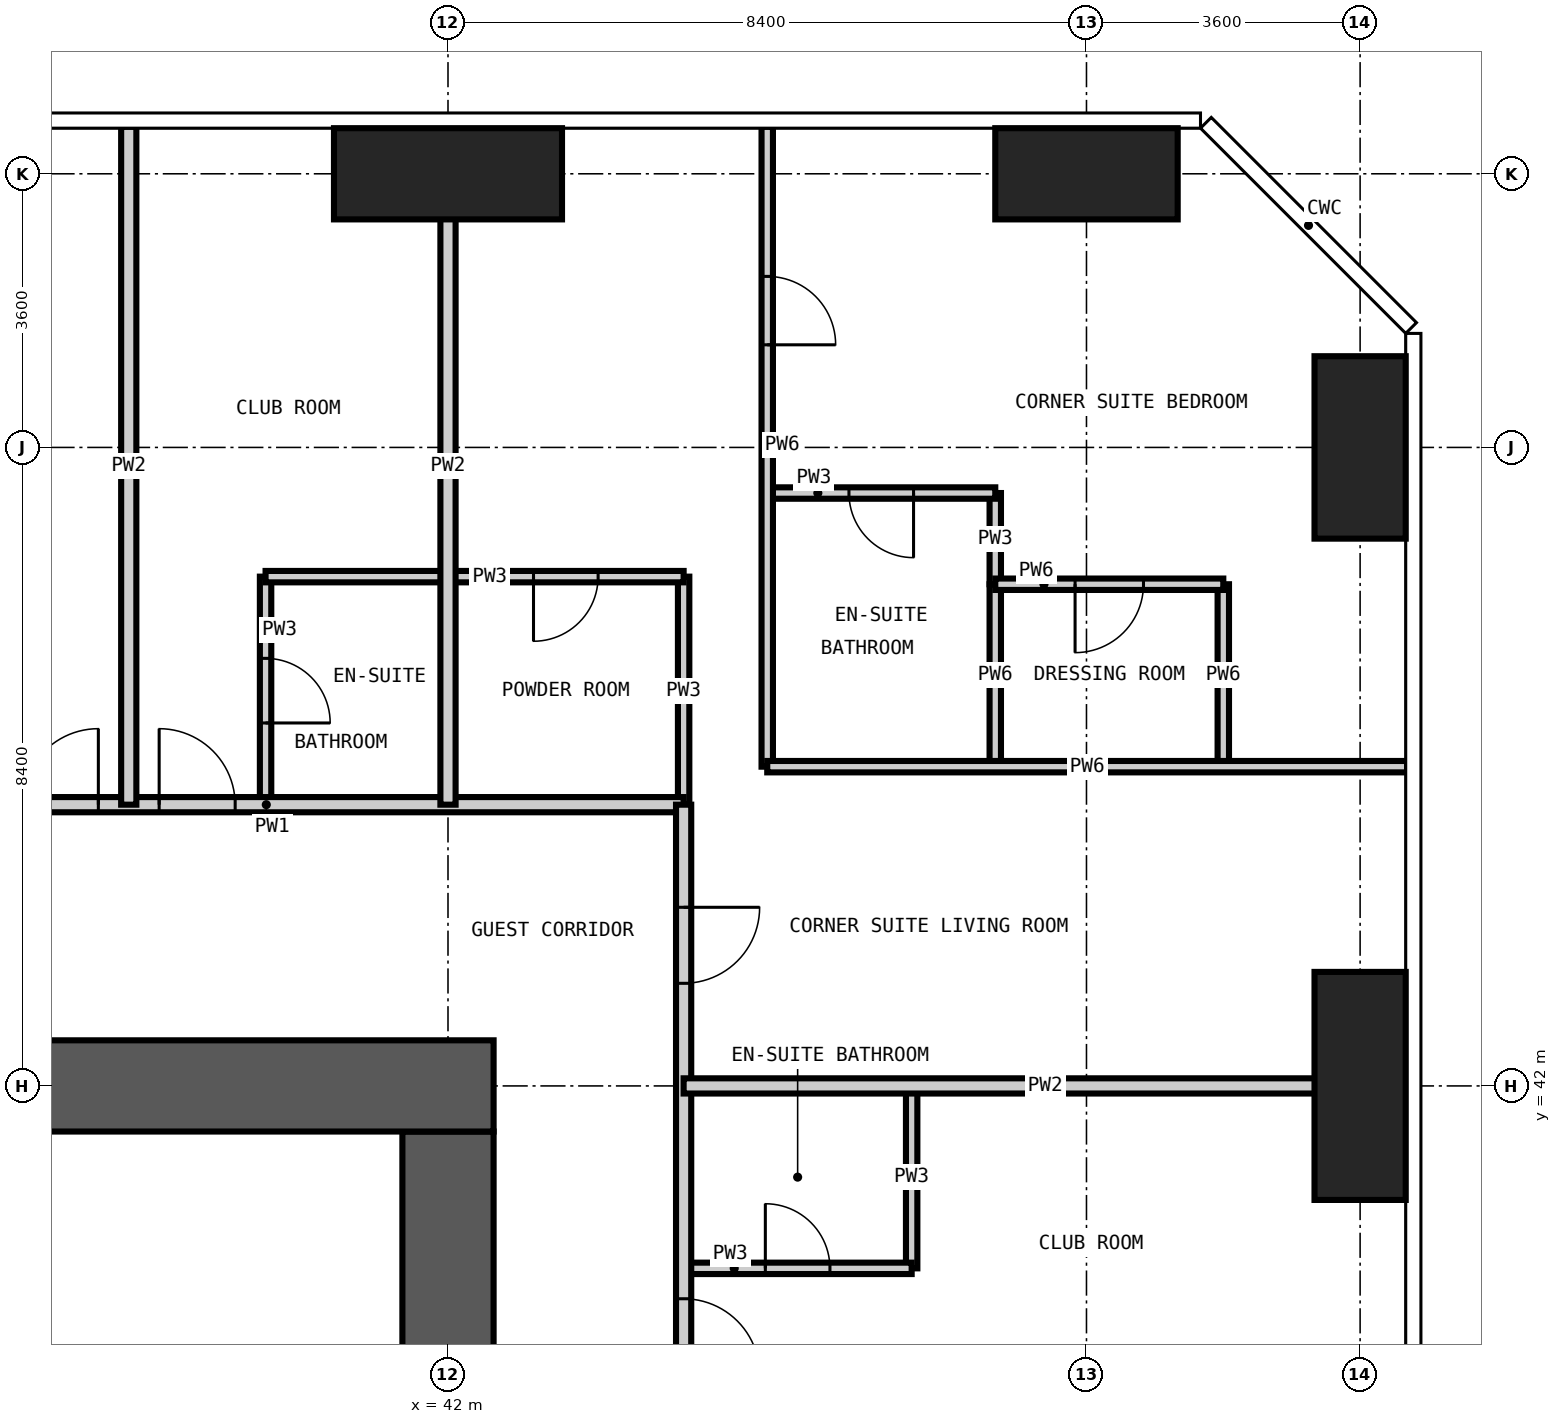
"""IFC4 building model, lengths in metres.
Left out: names, types, materials, properties, quantities, classifications, styles, units other than length and angle.
Written with IfcOpenShell. Run it as: python <this file> out.ifc"""

import sys

from ifc_helpers import new_model, si_unit, direction, frame, frame_2d, origin, origin_2d, place, context, subcontext, project, spatial, rectangle, extrude, element, fill, save


model = new_model("IFC4")
c1 = context("Model", 3, precision=1e-05, world=origin(), true_north=direction((0.0, 1.0)))
c2 = subcontext(c1, "Body", "Model", "MODEL_VIEW")
j1 = project(units=[si_unit("LENGTHUNIT", "METRE"), si_unit("PLANEANGLEUNIT", "RADIAN")], contexts=[c1])
p1 = place(None, origin())
s1 = spatial("IfcSite", under=j1, at=p1, CompositionType="ELEMENT")
p2 = place(p1, origin())
s2 = spatial("IfcBuilding", under=s1, at=p2, CompositionType="ELEMENT")
p3 = place(p2, frame((0.0, 0.0, 159.0)))
s3 = spatial("IfcBuildingStorey", under=s2, at=p3, CompositionType="ELEMENT", Elevation=159.0)
p4 = place(p3, frame((42.0, 54.0, -0.35), z_axis=(0.0, 0.0, 1.0), x_axis=(1.0, 0.0, 0.0)))
e1 = element("IfcColumn", 1, at=p4, inside=s3, PredefinedType="COLUMN", context=c2, shape_type="SweptSolid", body=[
    extrude(rectangle(XDim=3.0, YDim=1.2, at=origin_2d()), origin(), (0.0, 0.0, 1.0), 3.6),
])
p5 = place(p3, frame((50.4, 54.0, -0.35), z_axis=(0.0, 0.0, 1.0), x_axis=(1.0, 0.0, 0.0)))
e2 = element("IfcColumn", 2, at=p5, inside=s3, PredefinedType="COLUMN", context=c2, shape_type="SweptSolid", body=[
    extrude(rectangle(XDim=2.4, YDim=1.2, at=origin_2d()), origin(), (0.0, 0.0, 1.0), 3.6),
])
p6 = place(p3, frame((54.0, 42.0, -0.35), z_axis=(0.0, 0.0, 1.0), x_axis=(1.0, 0.0, 0.0)))
e3 = element("IfcColumn", 3, at=p6, inside=s3, PredefinedType="COLUMN", context=c2, shape_type="SweptSolid", body=[
    extrude(rectangle(XDim=1.2, YDim=3.0, at=origin_2d()), origin(), (0.0, 0.0, 1.0), 3.6),
])
p7 = place(p3, frame((54.0, 50.4, -0.35), z_axis=(0.0, 0.0, 1.0), x_axis=(1.0, 0.0, 0.0)))
e4 = element("IfcColumn", 4, at=p7, inside=s3, PredefinedType="COLUMN", context=c2, shape_type="SweptSolid", body=[
    extrude(rectangle(XDim=1.2, YDim=2.4, at=origin_2d()), origin(), (0.0, 0.0, 1.0), 3.6),
])
p8 = place(p3, frame((42.0, 17.4, -0.35), z_axis=(0.0, 0.0, 1.0), x_axis=(0.0, 1.0, 0.0)))
e5 = element("IfcWall", 5, at=p8, inside=s3, PredefinedType="SHEAR", context=c2, shape_type="SweptSolid", body=[
    extrude(rectangle(XDim=24.0, YDim=1.2, at=frame_2d((12.0, 0.0))), origin(), (0.0, 0.0, 1.0), 3.6),
])
p9 = place(p8, frame((0.2, 0.0, 0.35)))
e6 = element("IfcOpeningElement", 6, at=p9, cuts=e5, PredefinedType="OPENING", context=c2, shape_type="SweptSolid", body=[
    extrude(rectangle(XDim=1.2, YDim=2.2, at=frame_2d((0.6, 1.1))), frame((0.0, 0.61, 0.0), z_axis=(0.0, -1.0, 0.0), x_axis=(1.0, 0.0, 0.0)), (0.0, 0.0, 1.0), 1.22),
])
p10 = place(p8, frame((11.5, 0.0, 0.35)))
e7 = element("IfcOpeningElement", 7, at=p10, cuts=e5, PredefinedType="OPENING", context=c2, shape_type="SweptSolid", body=[
    extrude(rectangle(XDim=1.0, YDim=2.1, at=frame_2d((0.5, 1.05))), frame((0.0, 0.61, 0.0), z_axis=(0.0, -1.0, 0.0), x_axis=(1.0, 0.0, 0.0)), (0.0, 0.0, 1.0), 1.22),
])
p11 = place(p8, frame((19.9, 0.0, 0.35)))
e8 = element("IfcOpeningElement", 8, at=p11, cuts=e5, PredefinedType="OPENING", context=c2, shape_type="SweptSolid", body=[
    extrude(rectangle(XDim=1.0, YDim=2.1, at=frame_2d((0.5, 1.05))), frame((0.0, 0.61, 0.0), z_axis=(0.0, -1.0, 0.0), x_axis=(1.0, 0.0, 0.0)), (0.0, 0.0, 1.0), 1.22),
])
p12 = place(p3, frame((42.6, 42.0, -0.35), z_axis=(0.0, 0.0, 1.0), x_axis=(-1.0, 0.0, 0.0)))
e9 = element("IfcWall", 9, at=p12, inside=s3, PredefinedType="SHEAR", context=c2, shape_type="SweptSolid", body=[
    extrude(rectangle(XDim=26.4, YDim=1.2, at=frame_2d((13.2, 0.0))), origin(), (0.0, 0.0, 1.0), 3.6),
])
p13 = place(p12, frame((21.1, 0.0, 0.35)))
e10 = element("IfcOpeningElement", 10, at=p13, cuts=e9, PredefinedType="OPENING", context=c2, shape_type="SweptSolid", body=[
    extrude(rectangle(XDim=1.0, YDim=2.1, at=frame_2d((0.5, 1.05))), frame((0.0, 0.61, 0.0), z_axis=(0.0, -1.0, 0.0), x_axis=(1.0, 0.0, 0.0)), (0.0, 0.0, 1.0), 1.22),
])
p14 = place(p12, frame((10.5, 0.0, 0.35)))
e11 = element("IfcOpeningElement", 11, at=p14, cuts=e9, PredefinedType="OPENING", context=c2, shape_type="SweptSolid", body=[
    extrude(rectangle(XDim=1.2, YDim=2.2, at=frame_2d((0.6, 1.1))), frame((0.0, 0.61, 0.0), z_axis=(0.0, -1.0, 0.0), x_axis=(1.0, 0.0, 0.0)), (0.0, 0.0, 1.0), 1.22),
])
p15 = place(p3, frame((39.6, 45.7, 0.0), z_axis=(0.0, 0.0, 1.0), x_axis=(0.0, 1.0, 0.0)))
e12 = element("IfcWall", 12, at=p15, inside=s3, PredefinedType="PARTITIONING", context=c2, shape_type="SweptSolid", body=[
    extrude(rectangle(XDim=3.0, YDim=0.15, at=frame_2d((1.5, 0.0))), origin(), (0.0, 0.0, 1.0), 3.25),
])
p16 = place(p15, frame((1.075, 0.0, 0.0)))
e13 = element("IfcOpeningElement", 13, at=p16, cuts=e12, PredefinedType="OPENING", context=c2, shape_type="SweptSolid", body=[
    extrude(rectangle(XDim=0.85, YDim=2.1, at=frame_2d((0.425, 1.05))), frame((0.0, 0.085, 0.0), z_axis=(0.0, -1.0, 0.0), x_axis=(1.0, 0.0, 0.0)), (0.0, 0.0, 1.0), 0.17),
])
p17 = place(p3, frame((45.1, 45.7, 0.0), z_axis=(0.0, 0.0, 1.0), x_axis=(0.0, 1.0, 0.0)))
e14 = element("IfcWall", 14, at=p17, inside=s3, PredefinedType="PARTITIONING", context=c2, shape_type="SweptSolid", body=[
    extrude(rectangle(XDim=3.0, YDim=0.15, at=frame_2d((1.5, 0.0))), origin(), (0.0, 0.0, 1.0), 3.25),
])
p18 = place(p3, frame((48.1, 39.6, 0.0), z_axis=(0.0, 0.0, 1.0), x_axis=(0.0, 1.0, 0.0)))
e15 = element("IfcWall", 15, at=p18, inside=s3, PredefinedType="PARTITIONING", context=c2, shape_type="SweptSolid", body=[
    extrude(rectangle(XDim=2.4, YDim=0.15, at=frame_2d((1.2, 0.0))), origin(), (0.0, 0.0, 1.0), 3.25),
])
p19 = place(p3, frame((49.2, 48.6, 0.0), z_axis=(0.0, 0.0, 1.0), x_axis=(0.0, 1.0, 0.0)))
e16 = element("IfcWall", 16, at=p19, inside=s3, PredefinedType="PARTITIONING", context=c2, shape_type="SweptSolid", body=[
    extrude(rectangle(XDim=1.2, YDim=0.15, at=frame_2d((0.6, 0.0))), origin(), (0.0, 0.0, 1.0), 3.25),
])
p20 = place(p3, frame((45.1, 39.6, 0.0), z_axis=(0.0, 0.0, 1.0), x_axis=(1.0, 0.0, 0.0)))
e17 = element("IfcWall", 17, at=p20, inside=s3, PredefinedType="PARTITIONING", context=c2, shape_type="SweptSolid", body=[
    extrude(rectangle(XDim=3.0, YDim=0.15, at=frame_2d((1.5, 0.0))), origin(), (0.0, 0.0, 1.0), 3.25),
])
p21 = place(p20, frame((1.075, 0.0, 0.0)))
e18 = element("IfcOpeningElement", 18, at=p21, cuts=e17, PredefinedType="OPENING", context=c2, shape_type="SweptSolid", body=[
    extrude(rectangle(XDim=0.85, YDim=2.1, at=frame_2d((0.425, 1.05))), frame((0.0, 0.085, 0.0), z_axis=(0.0, -1.0, 0.0), x_axis=(1.0, 0.0, 0.0)), (0.0, 0.0, 1.0), 0.17),
])
p22 = place(p3, frame((39.6, 48.7, 0.0), z_axis=(0.0, 0.0, 1.0), x_axis=(1.0, 0.0, 0.0)))
e19 = element("IfcWall", 19, at=p22, inside=s3, PredefinedType="PARTITIONING", context=c2, shape_type="SweptSolid", body=[
    extrude(rectangle(XDim=5.5, YDim=0.15, at=frame_2d((2.75, 0.0))), origin(), (0.0, 0.0, 1.0), 3.25),
])
p23 = place(p22, frame((3.525, 0.0, 0.0)))
e20 = element("IfcOpeningElement", 20, at=p23, cuts=e19, PredefinedType="OPENING", context=c2, shape_type="SweptSolid", body=[
    extrude(rectangle(XDim=0.85, YDim=2.1, at=frame_2d((0.425, 1.05))), frame((0.0, 0.085, 0.0), z_axis=(0.0, -1.0, 0.0), x_axis=(1.0, 0.0, 0.0)), (0.0, 0.0, 1.0), 0.17),
])
p24 = place(p3, frame((46.2, 49.8, 0.0), z_axis=(0.0, 0.0, 1.0), x_axis=(1.0, 0.0, 0.0)))
e21 = element("IfcWall", 21, at=p24, inside=s3, PredefinedType="PARTITIONING", context=c2, shape_type="SweptSolid", body=[
    extrude(rectangle(XDim=3.0, YDim=0.15, at=frame_2d((1.5, 0.0))), origin(), (0.0, 0.0, 1.0), 3.25),
])
p25 = place(p24, frame((1.075, 0.0, 0.0)))
e22 = element("IfcOpeningElement", 22, at=p25, cuts=e21, PredefinedType="OPENING", context=c2, shape_type="SweptSolid", body=[
    extrude(rectangle(XDim=0.85, YDim=2.1, at=frame_2d((0.425, 1.05))), frame((0.0, 0.085, 0.0), z_axis=(0.0, -1.0, 0.0), x_axis=(1.0, 0.0, 0.0)), (0.0, 0.0, 1.0), 0.17),
])
p26 = place(p3, frame((33.6, 45.7, 0.0), z_axis=(0.0, 0.0, 1.0), x_axis=(1.0, 0.0, 0.0)))
e23 = element("IfcWall", 23, at=p26, inside=s3, PredefinedType="PARTITIONING", context=c2, shape_type="SweptSolid", body=[
    extrude(rectangle(XDim=11.5, YDim=0.2, at=frame_2d((5.75, 0.0))), origin(), (0.0, 0.0, 1.0), 3.25),
])
p27 = place(p26, frame((2.8, 0.0, 0.0)))
e24 = element("IfcOpeningElement", 24, at=p27, cuts=e23, PredefinedType="OPENING", context=c2, shape_type="SweptSolid", body=[
    extrude(rectangle(XDim=1.0, YDim=2.2, at=frame_2d((0.5, 1.1))), frame((0.0, 0.11, 0.0), z_axis=(0.0, -1.0, 0.0), x_axis=(1.0, 0.0, 0.0)), (0.0, 0.0, 1.0), 0.22),
])
p28 = place(p26, frame((4.6, 0.0, 0.0)))
e25 = element("IfcOpeningElement", 25, at=p28, cuts=e23, PredefinedType="OPENING", context=c2, shape_type="SweptSolid", body=[
    extrude(rectangle(XDim=1.0, YDim=2.2, at=frame_2d((0.5, 1.1))), frame((0.0, 0.11, 0.0), z_axis=(0.0, -1.0, 0.0), x_axis=(1.0, 0.0, 0.0)), (0.0, 0.0, 1.0), 0.22),
])
p29 = place(p3, frame((45.1, 45.7, 0.0), z_axis=(0.0, 0.0, 1.0), x_axis=(0.0, -1.0, 0.0)))
e26 = element("IfcWall", 26, at=p29, inside=s3, PredefinedType="PARTITIONING", context=c2, shape_type="SweptSolid", body=[
    extrude(rectangle(XDim=31.4, YDim=0.2, at=frame_2d((15.7, 0.0))), origin(), (0.0, 0.0, 1.0), 3.25),
])
p30 = place(p29, frame((25.1, 0.0, 0.0)))
e27 = element("IfcOpeningElement", 27, at=p30, cuts=e26, PredefinedType="OPENING", context=c2, shape_type="SweptSolid", body=[
    extrude(rectangle(XDim=1.0, YDim=2.2, at=frame_2d((0.5, 1.1))), frame((0.0, 0.11, 0.0), z_axis=(0.0, -1.0, 0.0), x_axis=(1.0, 0.0, 0.0)), (0.0, 0.0, 1.0), 0.22),
])
p31 = place(p29, frame((23.3, 0.0, 0.0)))
e28 = element("IfcOpeningElement", 28, at=p31, cuts=e26, PredefinedType="OPENING", context=c2, shape_type="SweptSolid", body=[
    extrude(rectangle(XDim=1.0, YDim=2.2, at=frame_2d((0.5, 1.1))), frame((0.0, 0.11, 0.0), z_axis=(0.0, -1.0, 0.0), x_axis=(1.0, 0.0, 0.0)), (0.0, 0.0, 1.0), 0.22),
])
p32 = place(p29, frame((16.7, 0.0, 0.0)))
e29 = element("IfcOpeningElement", 29, at=p32, cuts=e26, PredefinedType="OPENING", context=c2, shape_type="SweptSolid", body=[
    extrude(rectangle(XDim=1.0, YDim=2.2, at=frame_2d((0.5, 1.1))), frame((0.0, 0.11, 0.0), z_axis=(0.0, -1.0, 0.0), x_axis=(1.0, 0.0, 0.0)), (0.0, 0.0, 1.0), 0.22),
])
p33 = place(p29, frame((14.9, 0.0, 0.0)))
e30 = element("IfcOpeningElement", 30, at=p33, cuts=e26, PredefinedType="OPENING", context=c2, shape_type="SweptSolid", body=[
    extrude(rectangle(XDim=1.0, YDim=2.2, at=frame_2d((0.5, 1.1))), frame((0.0, 0.11, 0.0), z_axis=(0.0, -1.0, 0.0), x_axis=(1.0, 0.0, 0.0)), (0.0, 0.0, 1.0), 0.22),
])
p34 = place(p29, frame((8.3, 0.0, 0.0)))
e31 = element("IfcOpeningElement", 31, at=p34, cuts=e26, PredefinedType="OPENING", context=c2, shape_type="SweptSolid", body=[
    extrude(rectangle(XDim=1.0, YDim=2.2, at=frame_2d((0.5, 1.1))), frame((0.0, 0.11, 0.0), z_axis=(0.0, -1.0, 0.0), x_axis=(1.0, 0.0, 0.0)), (0.0, 0.0, 1.0), 0.22),
])
p35 = place(p29, frame((6.5, 0.0, 0.0)))
e32 = element("IfcOpeningElement", 32, at=p35, cuts=e26, PredefinedType="OPENING", context=c2, shape_type="SweptSolid", body=[
    extrude(rectangle(XDim=1.0, YDim=2.2, at=frame_2d((0.5, 1.1))), frame((0.0, 0.11, 0.0), z_axis=(0.0, -1.0, 0.0), x_axis=(1.0, 0.0, 0.0)), (0.0, 0.0, 1.0), 0.22),
])
p36 = place(p29, frame((29.65, 0.0, 0.0)))
e33 = element("IfcOpeningElement", 33, at=p36, cuts=e26, PredefinedType="OPENING", context=c2, shape_type="SweptSolid", body=[
    extrude(rectangle(XDim=1.0, YDim=2.2, at=frame_2d((0.5, 1.1))), frame((0.0, 0.11, 0.0), z_axis=(0.0, -1.0, 0.0), x_axis=(1.0, 0.0, 0.0)), (0.0, 0.0, 1.0), 0.22),
])
p37 = place(p29, frame((1.35, 0.0, 0.0)))
e34 = element("IfcOpeningElement", 34, at=p37, cuts=e26, PredefinedType="OPENING", context=c2, shape_type="SweptSolid", body=[
    extrude(rectangle(XDim=1.0, YDim=2.2, at=frame_2d((0.5, 1.1))), frame((0.0, 0.11, 0.0), z_axis=(0.0, -1.0, 0.0), x_axis=(1.0, 0.0, 0.0)), (0.0, 0.0, 1.0), 0.22),
])
for number, where, z_axis, x_axis in (
    (35, (37.8, 45.7, 0.0), (0.0, 0.0, 1.0), (0.0, 1.0, 0.0)),
    (36, (42.0, 45.7, 0.0), (0.0, 0.0, 1.0), (0.0, 1.0, 0.0)),
):
    element("IfcWall", number, at=place(p3, frame(where, z_axis=z_axis, x_axis=x_axis)), inside=s3, PredefinedType="PARTITIONING", context=c2, shape_type="SweptSolid", body=[
        extrude(rectangle(XDim=8.918, YDim=0.2, at=frame_2d((4.459, 0.0))), origin(), (0.0, 0.0, 1.0), 3.25),
    ])
p38 = place(p3, frame((45.1, 42.0, 0.0), z_axis=(0.0, 0.0, 1.0), x_axis=(1.0, 0.0, 0.0)))
e37 = element("IfcWall", 37, at=p38, inside=s3, PredefinedType="PARTITIONING", context=c2, shape_type="SweptSolid", body=[
    extrude(rectangle(XDim=9.518, YDim=0.2, at=frame_2d((4.759, 0.0))), origin(), (0.0, 0.0, 1.0), 3.25),
])
p39 = place(p3, frame((46.2, 46.2, 0.0), z_axis=(0.0, 0.0, 1.0), x_axis=(0.0, 1.0, 0.0)))
e38 = element("IfcWall", 38, at=p39, inside=s3, PredefinedType="PARTITIONING", context=c2, shape_type="SweptSolid", body=[
    extrude(rectangle(XDim=8.418, YDim=0.15, at=frame_2d((4.209, 0.0))), origin(), (0.0, 0.0, 1.0), 3.25),
])
p40 = place(p39, frame((5.55, 0.0, 0.0)))
e39 = element("IfcOpeningElement", 39, at=p40, cuts=e38, PredefinedType="OPENING", context=c2, shape_type="SweptSolid", body=[
    extrude(rectangle(XDim=0.9, YDim=2.1, at=frame_2d((0.45, 1.05))), frame((0.0, 0.085, 0.0), z_axis=(0.0, -1.0, 0.0), x_axis=(1.0, 0.0, 0.0)), (0.0, 0.0, 1.0), 0.17),
])
for number, where, z_axis, x_axis in (
    (40, (49.2, 46.2, 0.0), (0.0, 0.0, 1.0), (0.0, 1.0, 0.0)),
    (41, (52.2, 46.2, 0.0), (0.0, 0.0, 1.0), (0.0, 1.0, 0.0)),
):
    element("IfcWall", number, at=place(p3, frame(where, z_axis=z_axis, x_axis=x_axis)), inside=s3, PredefinedType="PARTITIONING", context=c2, shape_type="SweptSolid", body=[
        extrude(rectangle(XDim=2.4, YDim=0.15, at=frame_2d((1.2, 0.0))), origin(), (0.0, 0.0, 1.0), 3.25),
    ])
p41 = place(p3, frame((46.2, 46.2, 0.0), z_axis=(0.0, 0.0, 1.0), x_axis=(1.0, 0.0, 0.0)))
e42 = element("IfcWall", 42, at=p41, inside=s3, PredefinedType="PARTITIONING", context=c2, shape_type="SweptSolid", body=[
    extrude(rectangle(XDim=8.418, YDim=0.15, at=frame_2d((4.209, 0.0))), origin(), (0.0, 0.0, 1.0), 3.25),
])
p42 = place(p3, frame((49.2, 48.6, 0.0), z_axis=(0.0, 0.0, 1.0), x_axis=(1.0, 0.0, 0.0)))
e43 = element("IfcWall", 43, at=p42, inside=s3, PredefinedType="PARTITIONING", context=c2, shape_type="SweptSolid", body=[
    extrude(rectangle(XDim=3.0, YDim=0.15, at=frame_2d((1.5, 0.0))), origin(), (0.0, 0.0, 1.0), 3.25),
])
p43 = place(p42, frame((1.05, 0.0, 0.0)))
e44 = element("IfcOpeningElement", 44, at=p43, cuts=e43, PredefinedType="OPENING", context=c2, shape_type="SweptSolid", body=[
    extrude(rectangle(XDim=0.9, YDim=2.1, at=frame_2d((0.45, 1.05))), frame((0.0, 0.085, 0.0), z_axis=(0.0, -1.0, 0.0), x_axis=(1.0, 0.0, 0.0)), (0.0, 0.0, 1.0), 0.17),
])
p44 = place(p35, origin())
e45 = element("IfcDoor", 45, at=p44, inside=s3, OperationType="SINGLE_SWING_RIGHT", PredefinedType="DOOR", context=c2, shape_type="SweptSolid", body=[
    extrude(rectangle(XDim=1.0, YDim=2.2, at=frame_2d((0.5, 1.1))), frame((0.0, 0.025, 0.0), z_axis=(0.0, -1.0, 0.0), x_axis=(1.0, 0.0, 0.0)), (0.0, 0.0, 1.0), 0.05),
])
fill(e32, e45)
p45 = place(p21, origin())
e46 = element("IfcDoor", 46, at=p45, inside=s3, OperationType="SINGLE_SWING_LEFT", PredefinedType="DOOR", context=c2, shape_type="SweptSolid", body=[
    extrude(rectangle(XDim=0.85, YDim=2.1, at=frame_2d((0.425, 1.05))), frame((0.0, 0.025, 0.0), z_axis=(0.0, -1.0, 0.0), x_axis=(1.0, 0.0, 0.0)), (0.0, 0.0, 1.0), 0.05),
])
fill(e18, e46)
p46 = place(p27, origin())
e47 = element("IfcDoor", 47, at=p46, inside=s3, OperationType="SINGLE_SWING_RIGHT", PredefinedType="DOOR", context=c2, shape_type="SweptSolid", body=[
    extrude(rectangle(XDim=1.0, YDim=2.2, at=frame_2d((0.5, 1.1))), frame((0.0, 0.025, 0.0), z_axis=(0.0, -1.0, 0.0), x_axis=(1.0, 0.0, 0.0)), (0.0, 0.0, 1.0), 0.05),
])
fill(e24, e47)
p47 = place(p28, origin())
e48 = element("IfcDoor", 48, at=p47, inside=s3, OperationType="SINGLE_SWING_LEFT", PredefinedType="DOOR", context=c2, shape_type="SweptSolid", body=[
    extrude(rectangle(XDim=1.0, YDim=2.2, at=frame_2d((0.5, 1.1))), frame((0.0, 0.025, 0.0), z_axis=(0.0, -1.0, 0.0), x_axis=(1.0, 0.0, 0.0)), (0.0, 0.0, 1.0), 0.05),
])
fill(e25, e48)
p48 = place(p16, frame((0.85, 0.0, 0.0), z_axis=(0.0, 0.0, 1.0), x_axis=(-1.0, 0.0, 0.0)))
e49 = element("IfcDoor", 49, at=p48, inside=s3, OperationType="SINGLE_SWING_RIGHT", PredefinedType="DOOR", context=c2, shape_type="SweptSolid", body=[
    extrude(rectangle(XDim=0.85, YDim=2.1, at=frame_2d((0.425, 1.05))), frame((0.0, 0.025, 0.0), z_axis=(0.0, -1.0, 0.0), x_axis=(1.0, 0.0, 0.0)), (0.0, 0.0, 1.0), 0.05),
])
fill(e13, e49)
p49 = place(p37, origin())
e50 = element("IfcDoor", 50, at=p49, inside=s3, OperationType="SINGLE_SWING_LEFT", PredefinedType="DOOR", context=c2, shape_type="SweptSolid", body=[
    extrude(rectangle(XDim=1.0, YDim=2.2, at=frame_2d((0.5, 1.1))), frame((0.0, 0.025, 0.0), z_axis=(0.0, -1.0, 0.0), x_axis=(1.0, 0.0, 0.0)), (0.0, 0.0, 1.0), 0.05),
])
fill(e34, e50)
p50 = place(p23, frame((0.85, 0.0, 0.0), z_axis=(0.0, 0.0, 1.0), x_axis=(-1.0, 0.0, 0.0)))
e51 = element("IfcDoor", 51, at=p50, inside=s3, OperationType="SINGLE_SWING_RIGHT", PredefinedType="DOOR", context=c2, shape_type="SweptSolid", body=[
    extrude(rectangle(XDim=0.85, YDim=2.1, at=frame_2d((0.425, 1.05))), frame((0.0, 0.025, 0.0), z_axis=(0.0, -1.0, 0.0), x_axis=(1.0, 0.0, 0.0)), (0.0, 0.0, 1.0), 0.05),
])
fill(e20, e51)
p51 = place(p40, frame((0.9, 0.0, 0.0), z_axis=(0.0, 0.0, 1.0), x_axis=(-1.0, 0.0, 0.0)))
e52 = element("IfcDoor", 52, at=p51, inside=s3, OperationType="SINGLE_SWING_RIGHT", PredefinedType="DOOR", context=c2, shape_type="SweptSolid", body=[
    extrude(rectangle(XDim=0.9, YDim=2.1, at=frame_2d((0.45, 1.05))), frame((0.0, 0.025, 0.0), z_axis=(0.0, -1.0, 0.0), x_axis=(1.0, 0.0, 0.0)), (0.0, 0.0, 1.0), 0.05),
])
fill(e39, e52)
p52 = place(p25, frame((0.85, 0.0, 0.0), z_axis=(0.0, 0.0, 1.0), x_axis=(-1.0, 0.0, 0.0)))
e53 = element("IfcDoor", 53, at=p52, inside=s3, OperationType="SINGLE_SWING_LEFT", PredefinedType="DOOR", context=c2, shape_type="SweptSolid", body=[
    extrude(rectangle(XDim=0.85, YDim=2.1, at=frame_2d((0.425, 1.05))), frame((0.0, 0.025, 0.0), z_axis=(0.0, -1.0, 0.0), x_axis=(1.0, 0.0, 0.0)), (0.0, 0.0, 1.0), 0.05),
])
fill(e22, e53)
p53 = place(p43, frame((0.9, 0.0, 0.0), z_axis=(0.0, 0.0, 1.0), x_axis=(-1.0, 0.0, 0.0)))
e54 = element("IfcDoor", 54, at=p53, inside=s3, OperationType="SINGLE_SWING_RIGHT", PredefinedType="DOOR", context=c2, shape_type="SweptSolid", body=[
    extrude(rectangle(XDim=0.9, YDim=2.1, at=frame_2d((0.45, 1.05))), frame((0.0, 0.025, 0.0), z_axis=(0.0, -1.0, 0.0), x_axis=(1.0, 0.0, 0.0)), (0.0, 0.0, 1.0), 0.05),
])
fill(e44, e54)
save(model, sys.argv[1])
